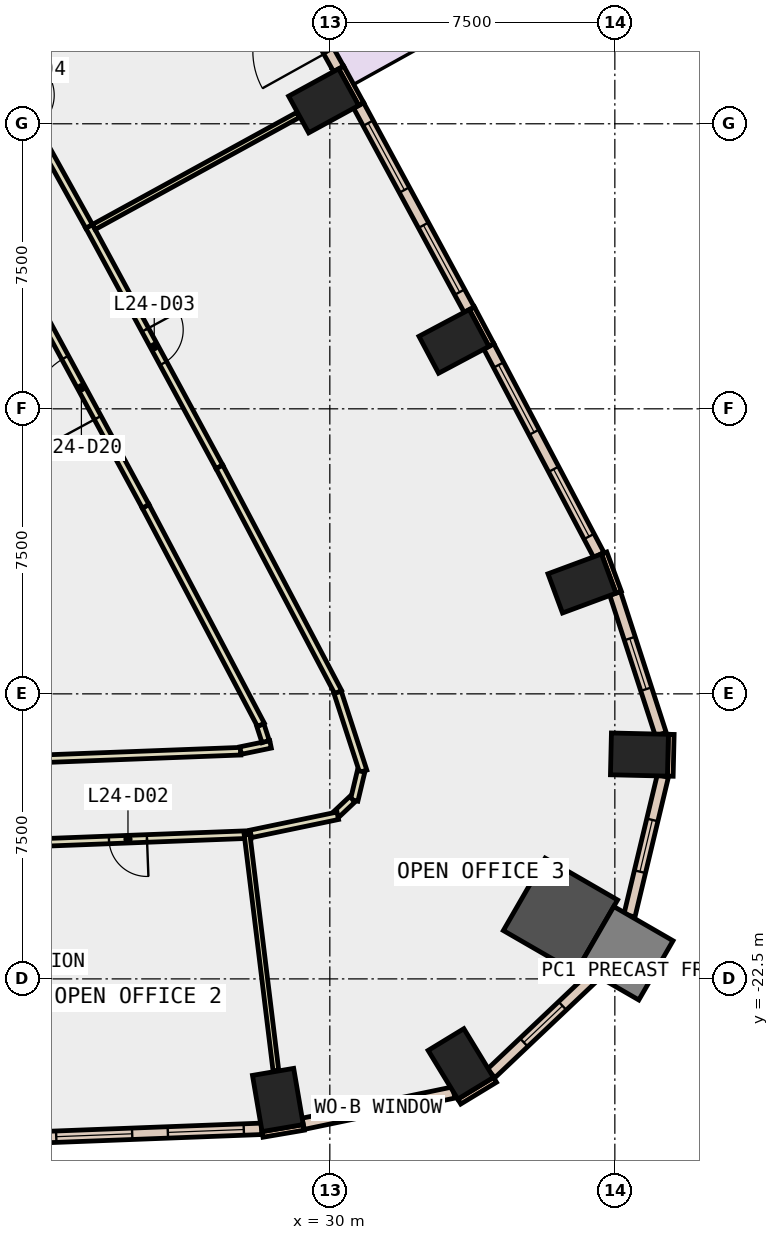
"""IFC4 building model, lengths in metres.
Left out: names, types, materials, properties, quantities, classifications, styles, units other than length and angle.
Written with IfcOpenShell. Run it as: python <this file> out.ifc"""

import sys

from ifc_helpers import new_model, si_unit, direction, frame, frame_2d, origin, origin_2d, place, context, subcontext, project, spatial, rectangle, extrude, element, fill, save


model = new_model("IFC4")
c1 = context("Model", 3, precision=1e-05, world=origin(), true_north=direction((0.0, 1.0)))
c2 = subcontext(c1, "Body", "Model", "MODEL_VIEW")
j1 = project(units=[si_unit("LENGTHUNIT", "METRE"), si_unit("PLANEANGLEUNIT", "RADIAN")], contexts=[c1])
p1 = place(None, origin())
s1 = spatial("IfcSite", under=j1, at=p1, CompositionType="ELEMENT")
p2 = place(p1, origin())
s2 = spatial("IfcBuilding", under=s1, at=p2, CompositionType="ELEMENT")
p3 = place(p2, frame((0.0, 0.0, 111.8)))
s3 = spatial("IfcBuildingStorey", under=s2, at=p3, CompositionType="ELEMENT", Elevation=111.8)
for number, where, z_axis, x_axis in (
    (1, (28.633, -25.686, -0.4), (0.0, 0.0, 1.0), (0.986, 0.168, 0.0)),
    (2, (33.447, -24.737, -0.4), (0.0, 0.0, 1.0), (0.854, 0.52, 0.0)),
):
    element("IfcColumn", number, at=place(p3, frame(where, z_axis=z_axis, x_axis=x_axis)), inside=s3, PredefinedType="COLUMN", context=c2, shape_type="SweptSolid", body=[
        extrude(rectangle(XDim=1.1, YDim=1.5, at=origin_2d()), origin(), (0.0, 0.0, 1.0), 4.2),
    ])
p4 = place(p3, frame((36.069, -20.825, -0.4), z_axis=(0.0, 0.0, 1.0), x_axis=(-0.866025403784, 0.5, 0.0)))
e3 = element("IfcColumn", 3, at=p4, inside=s3, PredefinedType="COLUMN", context=c2, shape_type="SweptSolid", body=[
    extrude(rectangle(XDim=2.2, YDim=2.2, at=origin_2d()), origin(), (0.0, 0.0, 1.0), 4.2),
])
for number, where, z_axis, x_axis in (
    (4, (38.147, -16.597, -0.4), (0.0, 0.0, 1.0), (0.023, 1.0, 0.0)),
    (5, (36.635, -12.096, -0.4), (0.0, 0.0, 1.0), (-0.347, 0.938, 0.0)),
    (6, (33.266, -5.726, -0.4), (0.0, 0.0, 1.0), (-0.469, 0.883, 0.0)),
    (7, (29.838, 0.604, -0.4), (0.0, 0.0, 1.0), (-0.48, 0.877, 0.0)),
):
    element("IfcColumn", number, at=place(p3, frame(where, z_axis=z_axis, x_axis=x_axis)), inside=s3, PredefinedType="COLUMN", context=c2, shape_type="SweptSolid", body=[
        extrude(rectangle(XDim=1.1, YDim=1.5, at=origin_2d()), origin(), (0.0, 0.0, 1.0), 4.2),
    ])
p5 = place(p3, frame((37.801, -21.825, -0.4), z_axis=(0.0, 0.0, 1.0), x_axis=(-0.866025403784, 0.5, 0.0)))
e8 = element("IfcColumn", 8, at=p5, inside=s3, PredefinedType="COLUMN", context=c2, shape_type="SweptSolid", body=[
    extrude(rectangle(XDim=1.8, YDim=1.8, at=origin_2d()), origin(), (0.0, 0.0, 1.0), 4.2),
])
p6 = place(p3, frame((37.6, -12.325, 0.0), z_axis=(0.0, 0.0, 1.0), x_axis=(-0.347205967468, 0.937788897436, 0.0)))
e9 = element("IfcWall", 9, at=p6, inside=s3, PredefinedType="STANDARD", context=c2, shape_type="SweptSolid", body=[
    extrude(rectangle(XDim=1.1, YDim=0.15, at=frame_2d((0.55, 0.0))), origin(), (0.0, 0.0, 1.0), 3.8),
])
p7 = place(p3, frame((34.253, -5.825, 0.0), z_axis=(0.0, 0.0, 1.0), x_axis=(-0.46919310775, 0.883095593716, 0.0)))
e10 = element("IfcWall", 10, at=p7, inside=s3, PredefinedType="STANDARD", context=c2, shape_type="SweptSolid", body=[
    extrude(rectangle(XDim=1.099, YDim=0.15, at=frame_2d((0.55, 0.0))), origin(), (0.0, 0.0, 1.0), 3.8),
])
for number, where, z_axis, x_axis in (
    (11, (30.826, 0.517, 0.0), (0.0, 0.0, 1.0), (-0.48, 0.878, 0.0)),
    (12, (28.229, -26.592, 0.0), (0.0, 0.0, 1.0), (0.986, 0.168, 0.0)),
):
    element("IfcWall", number, at=place(p3, frame(where, z_axis=z_axis, x_axis=x_axis)), inside=s3, PredefinedType="STANDARD", context=c2, shape_type="SweptSolid", body=[
        extrude(rectangle(XDim=1.101, YDim=0.15, at=frame_2d((0.55, 0.0))), origin(), (0.0, 0.0, 1.0), 3.8),
    ])
for number, where, z_axis, x_axis in (
    (13, (33.406, -25.728, 0.0), (0.0, 0.0, 1.0), (0.854, 0.52, 0.0)),
    (14, (38.959, -17.166, 0.0), (0.0, 0.0, 1.0), (0.024, 1.0, 0.0)),
):
    element("IfcWall", number, at=place(p3, frame(where, z_axis=z_axis, x_axis=x_axis)), inside=s3, PredefinedType="STANDARD", context=c2, shape_type="SweptSolid", body=[
        extrude(rectangle(XDim=1.1, YDim=0.15, at=frame_2d((0.55, 0.0))), origin(), (0.0, 0.0, 1.0), 3.8),
    ])
p8 = place(p3, frame((22.332, -26.67, 0.0), z_axis=(0.0, 0.0, 1.0), x_axis=(0.999267908582, 0.038257638169, 0.0)))
e15 = element("IfcWall", 15, at=p8, inside=s3, PredefinedType="STANDARD", context=c2, shape_type="SweptSolid", body=[
    extrude(rectangle(XDim=5.877, YDim=0.3, at=frame_2d((2.939, 0.0))), origin(), (0.0, 0.0, 1.0), 3.8),
])
p9 = place(p8, frame((0.469, 0.0, 0.9)))
e16 = element("IfcOpeningElement", 16, at=p9, cuts=e15, PredefinedType="OPENING", context=c2, shape_type="SweptSolid", body=[
    extrude(rectangle(XDim=2.0, YDim=2.6, at=frame_2d((1.0, 1.3))), frame((0.0, 0.16, 0.0), z_axis=(0.0, -1.0, 0.0), x_axis=(1.0, 0.0, 0.0)), (0.0, 0.0, 1.0), 0.32),
])
p10 = place(p8, frame((3.408, 0.0, 0.9)))
e17 = element("IfcOpeningElement", 17, at=p10, cuts=e15, PredefinedType="OPENING", context=c2, shape_type="SweptSolid", body=[
    extrude(rectangle(XDim=2.0, YDim=2.6, at=frame_2d((1.0, 1.3))), frame((0.0, 0.16, 0.0), z_axis=(0.0, -1.0, 0.0), x_axis=(1.0, 0.0, 0.0)), (0.0, 0.0, 1.0), 0.32),
])
p11 = place(p3, frame((29.297, -26.313, 0.0), z_axis=(0.0, 0.0, 1.0), x_axis=(0.979080614496, 0.203472726227, 0.0)))
e18 = element("IfcWall", 18, at=p11, inside=s3, PredefinedType="STANDARD", context=c2, shape_type="SweptSolid", body=[
    extrude(rectangle(XDim=4.05, YDim=0.3, at=frame_2d((2.025, 0.0))), origin(), (0.0, 0.0, 1.0), 3.8),
])
p12 = place(p11, frame((1.325, 0.0, 0.9)))
e19 = element("IfcOpeningElement", 19, at=p12, cuts=e18, PredefinedType="OPENING", context=c2, shape_type="SweptSolid", body=[
    extrude(rectangle(XDim=1.4, YDim=2.6, at=frame_2d((0.7, 1.3))), frame((0.0, 0.16, 0.0), z_axis=(0.0, -1.0, 0.0), x_axis=(1.0, 0.0, 0.0)), (0.0, 0.0, 1.0), 0.32),
])
p13 = place(p3, frame((34.243, -24.989, 0.0), z_axis=(0.0, 0.0, 1.0), x_axis=(0.726076674532, 0.687613745281, 0.0)))
e20 = element("IfcWall", 20, at=p13, inside=s3, PredefinedType="STANDARD", context=c2, shape_type="SweptSolid", body=[
    extrude(rectangle(XDim=3.777, YDim=0.3, at=frame_2d((1.888, 0.0))), origin(), (0.0, 0.0, 1.0), 3.8),
])
p14 = place(p13, frame((1.188, 0.0, 0.9)))
e21 = element("IfcOpeningElement", 21, at=p14, cuts=e20, PredefinedType="OPENING", context=c2, shape_type="SweptSolid", body=[
    extrude(rectangle(XDim=1.4, YDim=2.6, at=frame_2d((0.7, 1.3))), frame((0.0, 0.16, 0.0), z_axis=(0.0, -1.0, 0.0), x_axis=(1.0, 0.0, 0.0)), (0.0, 0.0, 1.0), 0.32),
])
p15 = place(p3, frame((37.884, -20.835, 0.0), z_axis=(0.0, 0.0, 1.0), x_axis=(0.232654276823, 0.972559503309, 0.0)))
e22 = element("IfcWall", 22, at=p15, inside=s3, PredefinedType="STANDARD", context=c2, shape_type="SweptSolid", body=[
    extrude(rectangle(XDim=3.778, YDim=0.3, at=frame_2d((1.889, 0.0))), origin(), (0.0, 0.0, 1.0), 3.8),
])
p16 = place(p15, frame((1.189, 0.0, 0.9)))
e23 = element("IfcOpeningElement", 23, at=p16, cuts=e22, PredefinedType="OPENING", context=c2, shape_type="SweptSolid", body=[
    extrude(rectangle(XDim=1.4, YDim=2.6, at=frame_2d((0.7, 1.3))), frame((0.0, 0.16, 0.0), z_axis=(0.0, -1.0, 0.0), x_axis=(1.0, 0.0, 0.0)), (0.0, 0.0, 1.0), 0.32),
])
p17 = place(p3, frame((38.709, -16.061, 0.0), z_axis=(0.0, 0.0, 1.0), x_axis=(-0.308484760821, 0.951229284842, 0.0)))
e24 = element("IfcWall", 24, at=p17, inside=s3, PredefinedType="STANDARD", context=c2, shape_type="SweptSolid", body=[
    extrude(rectangle(XDim=3.893, YDim=0.3, at=frame_2d((1.947, 0.0))), origin(), (0.0, 0.0, 1.0), 3.8),
])
p18 = place(p17, frame((1.246, 0.0, 0.9)))
e25 = element("IfcOpeningElement", 25, at=p18, cuts=e24, PredefinedType="OPENING", context=c2, shape_type="SweptSolid", body=[
    extrude(rectangle(XDim=1.4, YDim=2.6, at=frame_2d((0.7, 1.3))), frame((0.0, 0.16, 0.0), z_axis=(0.0, -1.0, 0.0), x_axis=(1.0, 0.0, 0.0)), (0.0, 0.0, 1.0), 0.32),
])
p19 = place(p3, frame((37.079, -11.346, 0.0), z_axis=(0.0, 0.0, 1.0), x_axis=(-0.466599547852, 0.88446868907, 0.0)))
e26 = element("IfcWall", 26, at=p19, inside=s3, PredefinedType="STANDARD", context=c2, shape_type="SweptSolid", body=[
    extrude(rectangle(XDim=6.202, YDim=0.3, at=frame_2d((3.101, 0.0))), origin(), (0.0, 0.0, 1.0), 3.8),
])
p20 = place(p19, frame((0.551, 0.0, 0.9)))
e27 = element("IfcOpeningElement", 27, at=p20, cuts=e26, PredefinedType="OPENING", context=c2, shape_type="SweptSolid", body=[
    extrude(rectangle(XDim=2.0, YDim=2.6, at=frame_2d((1.0, 1.3))), frame((0.0, 0.16, 0.0), z_axis=(0.0, -1.0, 0.0), x_axis=(1.0, 0.0, 0.0)), (0.0, 0.0, 1.0), 0.32),
])
p21 = place(p19, frame((3.652, 0.0, 0.9)))
e28 = element("IfcOpeningElement", 28, at=p21, cuts=e26, PredefinedType="OPENING", context=c2, shape_type="SweptSolid", body=[
    extrude(rectangle(XDim=2.0, YDim=2.6, at=frame_2d((1.0, 1.3))), frame((0.0, 0.16, 0.0), z_axis=(0.0, -1.0, 0.0), x_axis=(1.0, 0.0, 0.0)), (0.0, 0.0, 1.0), 0.32),
])
p22 = place(p3, frame((33.667, -4.892, 0.0), z_axis=(0.0, 0.0, 1.0), x_axis=(-0.476097776444, 0.879392351152, 0.0)))
e29 = element("IfcWall", 29, at=p22, inside=s3, PredefinedType="STANDARD", context=c2, shape_type="SweptSolid", body=[
    extrude(rectangle(XDim=6.11, YDim=0.3, at=frame_2d((3.055, 0.0))), origin(), (0.0, 0.0, 1.0), 3.8),
])
p23 = place(p22, frame((0.527, 0.0, 0.9)))
e30 = element("IfcOpeningElement", 30, at=p23, cuts=e29, PredefinedType="OPENING", context=c2, shape_type="SweptSolid", body=[
    extrude(rectangle(XDim=2.0, YDim=2.6, at=frame_2d((1.0, 1.3))), frame((0.0, 0.16, 0.0), z_axis=(0.0, -1.0, 0.0), x_axis=(1.0, 0.0, 0.0)), (0.0, 0.0, 1.0), 0.32),
])
p24 = place(p22, frame((3.582, 0.0, 0.9)))
e31 = element("IfcOpeningElement", 31, at=p24, cuts=e29, PredefinedType="OPENING", context=c2, shape_type="SweptSolid", body=[
    extrude(rectangle(XDim=2.0, YDim=2.6, at=frame_2d((1.0, 1.3))), frame((0.0, 0.16, 0.0), z_axis=(0.0, -1.0, 0.0), x_axis=(1.0, 0.0, 0.0)), (0.0, 0.0, 1.0), 0.32),
])
p25 = place(p3, frame((30.23, 1.444, 0.0), z_axis=(0.0, 0.0, 1.0), x_axis=(-0.485822751649, 0.874057351654, 0.0)))
e32 = element("IfcWall", 32, at=p25, inside=s3, PredefinedType="STANDARD", context=c2, shape_type="SweptSolid", body=[
    extrude(rectangle(XDim=6.109, YDim=0.3, at=frame_2d((3.055, 0.0))), origin(), (0.0, 0.0, 1.0), 3.8),
])
p26 = place(p25, frame((0.527, 0.0, 0.0)))
e33 = element("IfcOpeningElement", 33, at=p26, cuts=e32, PredefinedType="OPENING", context=c2, shape_type="SweptSolid", body=[
    extrude(rectangle(XDim=2.0, YDim=2.4, at=frame_2d((1.0, 1.2))), frame((0.0, 0.16, 0.0), z_axis=(0.0, -1.0, 0.0), x_axis=(1.0, 0.0, 0.0)), (0.0, 0.0, 1.0), 0.32),
])
p27 = place(p25, frame((3.582, 0.0, 0.9)))
e34 = element("IfcOpeningElement", 34, at=p27, cuts=e32, PredefinedType="OPENING", context=c2, shape_type="SweptSolid", body=[
    extrude(rectangle(XDim=2.0, YDim=2.6, at=frame_2d((1.0, 1.3))), frame((0.0, 0.16, 0.0), z_axis=(0.0, -1.0, 0.0), x_axis=(1.0, 0.0, 0.0)), (0.0, 0.0, 1.0), 0.32),
])
p28 = place(p3, frame((21.36, -16.75, 0.0), z_axis=(0.0, 0.0, 1.0), x_axis=(0.999267915235, 0.038257464404, 0.0)))
e35 = element("IfcWall", 35, at=p28, inside=s3, PredefinedType="PARTITIONING", context=c2, shape_type="SweptSolid", body=[
    extrude(rectangle(XDim=6.299, YDim=0.2, at=frame_2d((3.149, 0.0))), origin(), (0.0, 0.0, 1.0), 3.8),
])
p29 = place(p3, frame((27.652, -16.492, 0.0), z_axis=(0.0, 0.0, 1.0), x_axis=(0.979299848672, 0.202414936184, 0.0)))
e36 = element("IfcWall", 36, at=p29, inside=s3, PredefinedType="PARTITIONING", context=c2, shape_type="SweptSolid", body=[
    extrude(rectangle(XDim=0.804, YDim=0.2, at=frame_2d((0.402, 0.0))), origin(), (0.0, 0.0, 1.0), 3.8),
])
p30 = place(p3, frame((28.311, -16.254, 0.0), z_axis=(0.0, 0.0, 1.0), x_axis=(-0.3080060081, 0.951384411778, 0.0)))
e37 = element("IfcWall", 37, at=p30, inside=s3, PredefinedType="PARTITIONING", context=c2, shape_type="SweptSolid", body=[
    extrude(rectangle(XDim=0.455, YDim=0.2, at=frame_2d((0.228, 0.0))), origin(), (0.0, 0.0, 1.0), 3.8),
])
p31 = place(p3, frame((28.187, -15.815, 0.0), z_axis=(0.0, 0.0, 1.0), x_axis=(-0.466663976618, 0.884434696813, 0.0)))
e38 = element("IfcWall", 38, at=p31, inside=s3, PredefinedType="PARTITIONING", context=c2, shape_type="SweptSolid", body=[
    extrude(rectangle(XDim=6.501, YDim=0.2, at=frame_2d((3.25, 0.0))), origin(), (0.0, 0.0, 1.0), 3.8),
])
p32 = place(p3, frame((25.153, -10.065, 0.0), z_axis=(0.0, 0.0, 1.0), x_axis=(-0.476124717613, 0.87937776483, 0.0)))
e39 = element("IfcWall", 39, at=p32, inside=s3, PredefinedType="PARTITIONING", context=c2, shape_type="SweptSolid", body=[
    extrude(rectangle(XDim=7.099, YDim=0.2, at=frame_2d((3.55, 0.0))), origin(), (0.0, 0.0, 1.0), 3.8),
])
p33 = place(p32, frame((2.65, 0.0, 0.0)))
e40 = element("IfcOpeningElement", 40, at=p33, cuts=e39, PredefinedType="OPENING", context=c2, shape_type="SweptSolid", body=[
    extrude(rectangle(XDim=1.8, YDim=2.1, at=frame_2d((0.9, 1.05))), frame((0.0, 0.11, 0.0), z_axis=(0.0, -1.0, 0.0), x_axis=(1.0, 0.0, 0.0)), (0.0, 0.0, 1.0), 0.22),
])
p34 = place(p3, frame((27.922, -18.7, 0.0), z_axis=(0.0, 0.0, 1.0), x_axis=(-0.999265458352, -0.038321583274, 0.0)))
e41 = element("IfcWall", 41, at=p34, inside=s3, PredefinedType="PARTITIONING", context=c2, shape_type="SweptSolid", body=[
    extrude(rectangle(XDim=6.473, YDim=0.2, at=frame_2d((3.236, 0.0))), origin(), (0.0, 0.0, 1.0), 3.8),
])
p35 = place(p34, frame((2.736, 0.0, 0.0)))
e42 = element("IfcOpeningElement", 42, at=p35, cuts=e41, PredefinedType="OPENING", context=c2, shape_type="SweptSolid", body=[
    extrude(rectangle(XDim=1.0, YDim=2.1, at=frame_2d((0.5, 1.05))), frame((0.0, 0.11, 0.0), z_axis=(0.0, -1.0, 0.0), x_axis=(1.0, 0.0, 0.0)), (0.0, 0.0, 1.0), 0.22),
])
p36 = place(p3, frame((23.666, -2.698, 0.0), z_axis=(0.0, 0.0, 1.0), x_axis=(0.476195741963, -0.879339306148, 0.0)))
e43 = element("IfcWall", 43, at=p36, inside=s3, PredefinedType="PARTITIONING", context=c2, shape_type="SweptSolid", body=[
    extrude(rectangle(XDim=7.199, YDim=0.2, at=frame_2d((3.599, 0.0))), origin(), (0.0, 0.0, 1.0), 3.8),
])
p37 = place(p36, frame((3.099, 0.0, 0.0)))
e44 = element("IfcOpeningElement", 44, at=p37, cuts=e43, PredefinedType="OPENING", context=c2, shape_type="SweptSolid", body=[
    extrude(rectangle(XDim=1.0, YDim=2.1, at=frame_2d((0.5, 1.05))), frame((0.0, 0.11, 0.0), z_axis=(0.0, -1.0, 0.0), x_axis=(1.0, 0.0, 0.0)), (0.0, 0.0, 1.0), 0.22),
])
p38 = place(p3, frame((27.094, -9.028, 0.0), z_axis=(0.0, 0.0, 1.0), x_axis=(0.466559961767, -0.884489571491, 0.0)))
e45 = element("IfcWall", 45, at=p38, inside=s3, PredefinedType="PARTITIONING", context=c2, shape_type="SweptSolid", body=[
    extrude(rectangle(XDim=6.702, YDim=0.2, at=frame_2d((3.351, 0.0))), origin(), (0.0, 0.0, 1.0), 3.8),
])
p39 = place(p3, frame((30.205, -14.962, 0.0), z_axis=(0.0, 0.0, 1.0), x_axis=(0.308592319841, -0.951194396606, 0.0)))
e46 = element("IfcWall", 46, at=p39, inside=s3, PredefinedType="PARTITIONING", context=c2, shape_type="SweptSolid", body=[
    extrude(rectangle(XDim=2.18, YDim=0.2, at=frame_2d((1.09, 0.0))), origin(), (0.0, 0.0, 1.0), 3.8),
])
p40 = place(p3, frame((30.823, -17.038, 0.0), z_axis=(0.0, 0.0, 1.0), x_axis=(-0.2319010674, -0.972739376677, 0.0)))
e47 = element("IfcWall", 47, at=p40, inside=s3, PredefinedType="PARTITIONING", context=c2, shape_type="SweptSolid", body=[
    extrude(rectangle(XDim=0.784, YDim=0.2, at=frame_2d((0.392, 0.0))), origin(), (0.0, 0.0, 1.0), 3.8),
])
p41 = place(p3, frame((30.592, -17.773, 0.0), z_axis=(0.0, 0.0, 1.0), x_axis=(-0.727217805738, -0.68640677664, 0.0)))
e48 = element("IfcWall", 48, at=p41, inside=s3, PredefinedType="PARTITIONING", context=c2, shape_type="SweptSolid", body=[
    extrude(rectangle(XDim=0.562, YDim=0.2, at=frame_2d((0.281, 0.0))), origin(), (0.0, 0.0, 1.0), 3.8),
])
p42 = place(p3, frame((30.209, -18.208, 0.0), z_axis=(0.0, 0.0, 1.0), x_axis=(-0.979049860969, -0.203620651545, 0.0)))
e49 = element("IfcWall", 49, at=p42, inside=s3, PredefinedType="PARTITIONING", context=c2, shape_type="SweptSolid", body=[
    extrude(rectangle(XDim=2.338, YDim=0.2, at=frame_2d((1.169, 0.0))), origin(), (0.0, 0.0, 1.0), 3.8),
])
p43 = place(p3, frame((20.242, 3.462, 0.0), z_axis=(0.0, 0.0, 1.0), x_axis=(0.485742937917, -0.874101709336, 0.0)))
e50 = element("IfcWall", 50, at=p43, inside=s3, PredefinedType="PARTITIONING", context=c2, shape_type="SweptSolid", body=[
    extrude(rectangle(XDim=7.047, YDim=0.2, at=frame_2d((3.523, 0.0))), origin(), (0.0, 0.0, 1.0), 3.8),
])
p44 = place(p43, frame((3.099, 0.0, 0.0)))
e51 = element("IfcOpeningElement", 51, at=p44, cuts=e50, PredefinedType="OPENING", context=c2, shape_type="SweptSolid", body=[
    extrude(rectangle(XDim=1.0, YDim=2.1, at=frame_2d((0.5, 1.05))), frame((0.0, 0.11, 0.0), z_axis=(0.0, -1.0, 0.0), x_axis=(1.0, 0.0, 0.0)), (0.0, 0.0, 1.0), 0.22),
])
p45 = place(p3, frame((27.822, -18.704, 0.0), z_axis=(0.0, 0.0, 1.0), x_axis=(0.121325411006, -0.992612786863, 0.0)))
e52 = element("IfcWall", 52, at=p45, inside=s3, PredefinedType="PARTITIONING", context=c2, shape_type="SweptSolid", body=[
    extrude(rectangle(XDim=6.256, YDim=0.15, at=frame_2d((3.128, 0.0))), origin(), (0.0, 0.0, 1.0), 3.8),
])
p46 = place(p3, frame((23.789, -2.716, 0.0), z_axis=(0.0, 0.0, 1.0), x_axis=(0.876716532234, 0.481007403382, 0.0)))
e53 = element("IfcWall", 53, at=p46, inside=s3, PredefinedType="PARTITIONING", context=c2, shape_type="SweptSolid", body=[
    extrude(rectangle(XDim=6.131, YDim=0.15, at=frame_2d((3.065, 0.0))), origin(), (0.0, 0.0, 1.0), 3.8),
])
p47 = place(p9, origin())
e54 = element("IfcWindow", 54, at=p47, inside=s3, PartitioningType="SINGLE_PANEL", PredefinedType="WINDOW", context=c2, shape_type="SweptSolid", body=[
    extrude(rectangle(XDim=2.0, YDim=2.6, at=frame_2d((1.0, 1.3))), frame((0.0, 0.03, 0.0), z_axis=(0.0, -1.0, 0.0), x_axis=(1.0, 0.0, 0.0)), (0.0, 0.0, 1.0), 0.06),
])
fill(e16, e54)
p48 = place(p10, origin())
e55 = element("IfcWindow", 55, at=p48, inside=s3, PartitioningType="SINGLE_PANEL", PredefinedType="WINDOW", context=c2, shape_type="SweptSolid", body=[
    extrude(rectangle(XDim=2.0, YDim=2.6, at=frame_2d((1.0, 1.3))), frame((0.0, 0.03, 0.0), z_axis=(0.0, -1.0, 0.0), x_axis=(1.0, 0.0, 0.0)), (0.0, 0.0, 1.0), 0.06),
])
fill(e17, e55)
p49 = place(p12, origin())
e56 = element("IfcWindow", 56, at=p49, inside=s3, PartitioningType="SINGLE_PANEL", PredefinedType="WINDOW", context=c2, shape_type="SweptSolid", body=[
    extrude(rectangle(XDim=1.4, YDim=2.6, at=frame_2d((0.7, 1.3))), frame((0.0, 0.03, 0.0), z_axis=(0.0, -1.0, 0.0), x_axis=(1.0, 0.0, 0.0)), (0.0, 0.0, 1.0), 0.06),
])
fill(e19, e56)
p50 = place(p14, origin())
e57 = element("IfcWindow", 57, at=p50, inside=s3, PartitioningType="SINGLE_PANEL", PredefinedType="WINDOW", context=c2, shape_type="SweptSolid", body=[
    extrude(rectangle(XDim=1.4, YDim=2.6, at=frame_2d((0.7, 1.3))), frame((0.0, 0.03, 0.0), z_axis=(0.0, -1.0, 0.0), x_axis=(1.0, 0.0, 0.0)), (0.0, 0.0, 1.0), 0.06),
])
fill(e21, e57)
p51 = place(p16, origin())
e58 = element("IfcWindow", 58, at=p51, inside=s3, PartitioningType="SINGLE_PANEL", PredefinedType="WINDOW", context=c2, shape_type="SweptSolid", body=[
    extrude(rectangle(XDim=1.4, YDim=2.6, at=frame_2d((0.7, 1.3))), frame((0.0, 0.03, 0.0), z_axis=(0.0, -1.0, 0.0), x_axis=(1.0, 0.0, 0.0)), (0.0, 0.0, 1.0), 0.06),
])
fill(e23, e58)
p52 = place(p18, origin())
e59 = element("IfcWindow", 59, at=p52, inside=s3, PartitioningType="SINGLE_PANEL", PredefinedType="WINDOW", context=c2, shape_type="SweptSolid", body=[
    extrude(rectangle(XDim=1.4, YDim=2.6, at=frame_2d((0.7, 1.3))), frame((0.0, 0.03, 0.0), z_axis=(0.0, -1.0, 0.0), x_axis=(1.0, 0.0, 0.0)), (0.0, 0.0, 1.0), 0.06),
])
fill(e25, e59)
p53 = place(p20, origin())
e60 = element("IfcWindow", 60, at=p53, inside=s3, PartitioningType="SINGLE_PANEL", PredefinedType="WINDOW", context=c2, shape_type="SweptSolid", body=[
    extrude(rectangle(XDim=2.0, YDim=2.6, at=frame_2d((1.0, 1.3))), frame((0.0, 0.03, 0.0), z_axis=(0.0, -1.0, 0.0), x_axis=(1.0, 0.0, 0.0)), (0.0, 0.0, 1.0), 0.06),
])
fill(e27, e60)
p54 = place(p21, origin())
e61 = element("IfcWindow", 61, at=p54, inside=s3, PartitioningType="SINGLE_PANEL", PredefinedType="WINDOW", context=c2, shape_type="SweptSolid", body=[
    extrude(rectangle(XDim=2.0, YDim=2.6, at=frame_2d((1.0, 1.3))), frame((0.0, 0.03, 0.0), z_axis=(0.0, -1.0, 0.0), x_axis=(1.0, 0.0, 0.0)), (0.0, 0.0, 1.0), 0.06),
])
fill(e28, e61)
p55 = place(p23, origin())
e62 = element("IfcWindow", 62, at=p55, inside=s3, PartitioningType="SINGLE_PANEL", PredefinedType="WINDOW", context=c2, shape_type="SweptSolid", body=[
    extrude(rectangle(XDim=2.0, YDim=2.6, at=frame_2d((1.0, 1.3))), frame((0.0, 0.03, 0.0), z_axis=(0.0, -1.0, 0.0), x_axis=(1.0, 0.0, 0.0)), (0.0, 0.0, 1.0), 0.06),
])
fill(e30, e62)
p56 = place(p24, origin())
e63 = element("IfcWindow", 63, at=p56, inside=s3, PartitioningType="SINGLE_PANEL", PredefinedType="WINDOW", context=c2, shape_type="SweptSolid", body=[
    extrude(rectangle(XDim=2.0, YDim=2.6, at=frame_2d((1.0, 1.3))), frame((0.0, 0.03, 0.0), z_axis=(0.0, -1.0, 0.0), x_axis=(1.0, 0.0, 0.0)), (0.0, 0.0, 1.0), 0.06),
])
fill(e31, e63)
p57 = place(p35, origin())
e64 = element("IfcDoor", 64, at=p57, inside=s3, OperationType="SINGLE_SWING_LEFT", PredefinedType="DOOR", context=c2, shape_type="SweptSolid", body=[
    extrude(rectangle(XDim=1.0, YDim=2.1, at=frame_2d((0.5, 1.05))), frame((0.0, 0.025, 0.0), z_axis=(0.0, -1.0, 0.0), x_axis=(1.0, 0.0, 0.0)), (0.0, 0.0, 1.0), 0.05),
])
fill(e42, e64)
p58 = place(p37, origin())
e65 = element("IfcDoor", 65, at=p58, inside=s3, OperationType="SINGLE_SWING_RIGHT", PredefinedType="DOOR", context=c2, shape_type="SweptSolid", body=[
    extrude(rectangle(XDim=1.0, YDim=2.1, at=frame_2d((0.5, 1.05))), frame((0.0, 0.025, 0.0), z_axis=(0.0, -1.0, 0.0), x_axis=(1.0, 0.0, 0.0)), (0.0, 0.0, 1.0), 0.05),
])
fill(e44, e65)
p59 = place(p33, origin())
e66 = element("IfcDoor", 66, at=p59, inside=s3, OperationType="DOUBLE_DOOR_SINGLE_SWING", PredefinedType="DOOR", context=c2, shape_type="SweptSolid", body=[
    extrude(rectangle(XDim=1.8, YDim=2.1, at=frame_2d((0.9, 1.05))), frame((0.0, 0.025, 0.0), z_axis=(0.0, -1.0, 0.0), x_axis=(1.0, 0.0, 0.0)), (0.0, 0.0, 1.0), 0.05),
])
fill(e40, e66)
save(model, sys.argv[1])
